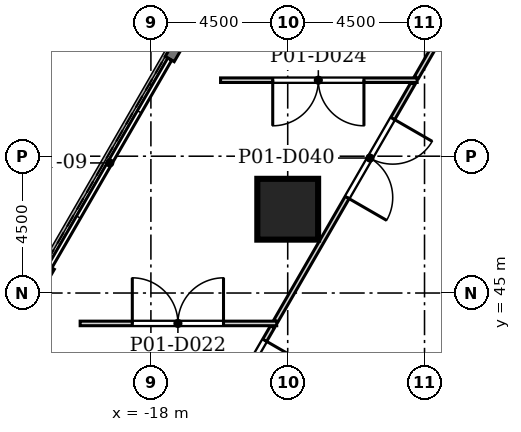
"""IFC4 building model, lengths in metres.
Left out: names, types, materials, properties, quantities, classifications, styles, units other than length and angle.
Written with IfcOpenShell. Run it as: python <this file> out.ifc"""

import sys

from ifc_helpers import new_model, si_unit, direction, frame, frame_2d, origin, origin_2d, place, context, subcontext, project, spatial, rectangle, extrude, element, fill, save


model = new_model("IFC4")
c1 = context("Model", 3, precision=1e-05, world=origin(), true_north=direction((0.0, 1.0)))
c2 = subcontext(c1, "Body", "Model", "MODEL_VIEW")
j1 = project(units=[si_unit("LENGTHUNIT", "METRE"), si_unit("PLANEANGLEUNIT", "RADIAN")], contexts=[c1])
p1 = place(None, origin())
s1 = spatial("IfcSite", under=j1, at=p1, CompositionType="ELEMENT")
p2 = place(p1, origin())
s2 = spatial("IfcBuilding", under=s1, at=p2, CompositionType="ELEMENT")
p3 = place(p2, frame((0.0, 0.0, 8.0)))
s3 = spatial("IfcBuildingStorey", under=s2, at=p3, CompositionType="ELEMENT", Elevation=8.0)
p4 = place(p3, frame((-13.5, 47.756, 0.0), z_axis=(0.0, 0.0, 1.0), x_axis=(1.0, 0.0, 0.0)))
e1 = element("IfcColumn", 1, at=p4, inside=s3, PredefinedType="COLUMN", context=c2, shape_type="SweptSolid", body=[
    extrude(rectangle(XDim=2.0, YDim=2.0, at=origin_2d()), origin(), (0.0, 0.0, 1.0), 6.0),
])
p5 = place(p3, frame((-9.324, 66.649, 0.0), z_axis=(0.0, 0.0, 1.0), x_axis=(-0.500010528026, -0.866019325341, 0.0)))
e2 = element("IfcWall", 2, at=p5, inside=s3, PredefinedType="SOLIDWALL", context=c2, shape_type="SweptSolid", body=[
    extrude(rectangle(XDim=16.115, YDim=0.34, at=frame_2d((8.058, 0.0))), origin(), (0.0, 0.0, 1.0), 5.7),
])
p6 = place(p5, frame((1.115, 0.0, 0.9)))
e3 = element("IfcOpeningElement", 3, at=p6, cuts=e2, PredefinedType="OPENING", context=c2, shape_type="SweptSolid", body=[
    extrude(rectangle(XDim=1.885, YDim=3.5, at=frame_2d((0.942, 1.75))), frame((0.0, 0.18, 0.0), z_axis=(0.0, -1.0, 0.0), x_axis=(1.0, 0.0, 0.0)), (0.0, 0.0, 1.0), 0.36),
])
p7 = place(p5, frame((4.115, 0.0, 0.9)))
e4 = element("IfcOpeningElement", 4, at=p7, cuts=e2, PredefinedType="OPENING", context=c2, shape_type="SweptSolid", body=[
    extrude(rectangle(XDim=1.885, YDim=3.5, at=frame_2d((0.942, 1.75))), frame((0.0, 0.18, 0.0), z_axis=(0.0, -1.0, 0.0), x_axis=(1.0, 0.0, 0.0)), (0.0, 0.0, 1.0), 0.36),
])
p8 = place(p5, frame((7.115, 0.0, 0.9)))
e5 = element("IfcOpeningElement", 5, at=p8, cuts=e2, PredefinedType="OPENING", context=c2, shape_type="SweptSolid", body=[
    extrude(rectangle(XDim=1.885, YDim=3.5, at=frame_2d((0.942, 1.75))), frame((0.0, 0.18, 0.0), z_axis=(0.0, -1.0, 0.0), x_axis=(1.0, 0.0, 0.0)), (0.0, 0.0, 1.0), 0.36),
])
p9 = place(p5, frame((10.115, 0.0, 0.9)))
e6 = element("IfcOpeningElement", 6, at=p9, cuts=e2, PredefinedType="OPENING", context=c2, shape_type="SweptSolid", body=[
    extrude(rectangle(XDim=1.885, YDim=3.5, at=frame_2d((0.942, 1.75))), frame((0.0, 0.18, 0.0), z_axis=(0.0, -1.0, 0.0), x_axis=(1.0, 0.0, 0.0)), (0.0, 0.0, 1.0), 0.36),
])
p10 = place(p5, frame((13.115, 0.0, 0.9)))
e7 = element("IfcOpeningElement", 7, at=p10, cuts=e2, PredefinedType="OPENING", context=c2, shape_type="SweptSolid", body=[
    extrude(rectangle(XDim=1.885, YDim=3.5, at=frame_2d((0.942, 1.75))), frame((0.0, 0.18, 0.0), z_axis=(0.0, -1.0, 0.0), x_axis=(1.0, 0.0, 0.0)), (0.0, 0.0, 1.0), 0.36),
])
p11 = place(p3, frame((-21.324, 45.864, 0.0), z_axis=(0.0, 0.0, 1.0), x_axis=(-0.500003967864, -0.866023112925, 0.0)))
e8 = element("IfcWall", 8, at=p11, inside=s3, PredefinedType="SOLIDWALL", context=c2, shape_type="SweptSolid", body=[
    extrude(rectangle(XDim=16.115, YDim=0.34, at=frame_2d((8.058, 0.0))), origin(), (0.0, 0.0, 1.0), 5.7),
])
p12 = place(p11, frame((1.115, 0.0, 0.9)))
e9 = element("IfcOpeningElement", 9, at=p12, cuts=e8, PredefinedType="OPENING", context=c2, shape_type="SweptSolid", body=[
    extrude(rectangle(XDim=1.885, YDim=3.5, at=frame_2d((0.942, 1.75))), frame((0.0, 0.18, 0.0), z_axis=(0.0, -1.0, 0.0), x_axis=(1.0, 0.0, 0.0)), (0.0, 0.0, 1.0), 0.36),
])
p13 = place(p11, frame((4.115, 0.0, 0.9)))
e10 = element("IfcOpeningElement", 10, at=p13, cuts=e8, PredefinedType="OPENING", context=c2, shape_type="SweptSolid", body=[
    extrude(rectangle(XDim=1.885, YDim=3.5, at=frame_2d((0.942, 1.75))), frame((0.0, 0.18, 0.0), z_axis=(0.0, -1.0, 0.0), x_axis=(1.0, 0.0, 0.0)), (0.0, 0.0, 1.0), 0.36),
])
p14 = place(p11, frame((7.115, 0.0, 0.9)))
e11 = element("IfcOpeningElement", 11, at=p14, cuts=e8, PredefinedType="OPENING", context=c2, shape_type="SweptSolid", body=[
    extrude(rectangle(XDim=1.885, YDim=3.5, at=frame_2d((0.942, 1.75))), frame((0.0, 0.18, 0.0), z_axis=(0.0, -1.0, 0.0), x_axis=(1.0, 0.0, 0.0)), (0.0, 0.0, 1.0), 0.36),
])
p15 = place(p11, frame((10.115, 0.0, 0.9)))
e12 = element("IfcOpeningElement", 12, at=p15, cuts=e8, PredefinedType="OPENING", context=c2, shape_type="SweptSolid", body=[
    extrude(rectangle(XDim=1.885, YDim=3.5, at=frame_2d((0.942, 1.75))), frame((0.0, 0.18, 0.0), z_axis=(0.0, -1.0, 0.0), x_axis=(1.0, 0.0, 0.0)), (0.0, 0.0, 1.0), 0.36),
])
p16 = place(p11, frame((13.115, 0.0, 0.9)))
e13 = element("IfcOpeningElement", 13, at=p16, cuts=e8, PredefinedType="OPENING", context=c2, shape_type="SweptSolid", body=[
    extrude(rectangle(XDim=1.885, YDim=3.5, at=frame_2d((0.942, 1.75))), frame((0.0, 0.18, 0.0), z_axis=(0.0, -1.0, 0.0), x_axis=(1.0, 0.0, 0.0)), (0.0, 0.0, 1.0), 0.36),
])
p17 = place(p3, frame((-19.494, 34.374, 0.0), z_axis=(0.0, 0.0, 1.0), x_axis=(0.500006534994, 0.866021630771, 0.0)))
e14 = element("IfcWall", 14, at=p17, inside=s3, PredefinedType="PARTITIONING", context=c2, shape_type="SweptSolid", body=[
    extrude(rectangle(XDim=10.985, YDim=0.15, at=frame_2d((5.493, 0.0))), origin(), (0.0, 0.0, 1.0), 5.7),
])
p18 = place(p17, frame((7.475, 0.0, 0.0)))
e15 = element("IfcOpeningElement", 15, at=p18, cuts=e14, PredefinedType="OPENING", context=c2, shape_type="SweptSolid", body=[
    extrude(rectangle(XDim=3.0, YDim=2.4, at=frame_2d((1.5, 1.2))), frame((0.0, 0.085, 0.0), z_axis=(0.0, -1.0, 0.0), x_axis=(1.0, 0.0, 0.0)), (0.0, 0.0, 1.0), 0.17),
])
p19 = place(p3, frame((-20.327, 44.0, 0.0), z_axis=(0.0, 0.0, 1.0), x_axis=(1.0, 0.0, 0.0)))
e16 = element("IfcWall", 16, at=p19, inside=s3, PredefinedType="PARTITIONING", context=c2, shape_type="SweptSolid", body=[
    extrude(rectangle(XDim=6.466, YDim=0.15, at=frame_2d((3.233, 0.0))), origin(), (0.0, 0.0, 1.0), 5.7),
])
p20 = place(p19, frame((1.716, 0.0, 0.0)))
e17 = element("IfcOpeningElement", 17, at=p20, cuts=e16, PredefinedType="OPENING", context=c2, shape_type="SweptSolid", body=[
    extrude(rectangle(XDim=3.0, YDim=2.4, at=frame_2d((1.5, 1.2))), frame((0.0, 0.085, 0.0), z_axis=(0.0, -1.0, 0.0), x_axis=(1.0, 0.0, 0.0)), (0.0, 0.0, 1.0), 0.17),
])
p21 = place(p3, frame((-13.885, 44.088, 0.0), z_axis=(0.0, 0.0, 1.0), x_axis=(0.499987617168, 0.866032552898, 0.0)))
e18 = element("IfcWall", 18, at=p21, inside=s3, PredefinedType="PARTITIONING", context=c2, shape_type="SweptSolid", body=[
    extrude(rectangle(XDim=9.006, YDim=0.15, at=frame_2d((4.503, 0.0))), origin(), (0.0, 0.0, 1.0), 5.7),
])
p22 = place(p21, frame((4.68, 0.0, 0.0)))
e19 = element("IfcOpeningElement", 19, at=p22, cuts=e18, PredefinedType="OPENING", context=c2, shape_type="SweptSolid", body=[
    extrude(rectangle(XDim=3.0, YDim=2.4, at=frame_2d((1.5, 1.2))), frame((0.0, 0.085, 0.0), z_axis=(0.0, -1.0, 0.0), x_axis=(1.0, 0.0, 0.0)), (0.0, 0.0, 1.0), 0.17),
])
p23 = place(p3, frame((-15.709, 52.0, 0.0), z_axis=(0.0, 0.0, 1.0), x_axis=(1.0, 0.0, 0.0)))
e20 = element("IfcWall", 20, at=p23, inside=s3, PredefinedType="PARTITIONING", context=c2, shape_type="SweptSolid", body=[
    extrude(rectangle(XDim=6.466, YDim=0.15, at=frame_2d((3.233, 0.0))), origin(), (0.0, 0.0, 1.0), 5.7),
])
p24 = place(p23, frame((1.716, 0.0, 0.0)))
e21 = element("IfcOpeningElement", 21, at=p24, cuts=e20, PredefinedType="OPENING", context=c2, shape_type="SweptSolid", body=[
    extrude(rectangle(XDim=3.0, YDim=2.4, at=frame_2d((1.5, 1.2))), frame((0.0, 0.085, 0.0), z_axis=(0.0, -1.0, 0.0), x_axis=(1.0, 0.0, 0.0)), (0.0, 0.0, 1.0), 0.17),
])
p25 = place(p3, frame((-9.267, 52.088, 0.0), z_axis=(0.0, 0.0, 1.0), x_axis=(0.499906209203, 0.866079547155, 0.0)))
e22 = element("IfcWall", 22, at=p25, inside=s3, PredefinedType="PARTITIONING", context=c2, shape_type="SweptSolid", body=[
    extrude(rectangle(XDim=2.684, YDim=0.15, at=frame_2d((1.342, 0.0))), origin(), (0.0, 0.0, 1.0), 5.7),
])
p26 = place(p20, origin())
e23 = element("IfcDoor", 23, at=p26, inside=s3, OperationType="DOUBLE_DOOR_SINGLE_SWING", PredefinedType="DOOR", context=c2, shape_type="SweptSolid", body=[
    extrude(rectangle(XDim=3.0, YDim=2.4, at=frame_2d((1.5, 1.2))), frame((0.0, 0.025, 0.0), z_axis=(0.0, -1.0, 0.0), x_axis=(1.0, 0.0, 0.0)), (0.0, 0.0, 1.0), 0.05),
])
fill(e17, e23)
p27 = place(p24, frame((3.0, 0.0, 0.0), z_axis=(0.0, 0.0, 1.0), x_axis=(-1.0, 0.0, 0.0)))
e24 = element("IfcDoor", 24, at=p27, inside=s3, OperationType="DOUBLE_DOOR_SINGLE_SWING", PredefinedType="DOOR", context=c2, shape_type="SweptSolid", body=[
    extrude(rectangle(XDim=3.0, YDim=2.4, at=frame_2d((1.5, 1.2))), frame((0.0, 0.025, 0.0), z_axis=(0.0, -1.0, 0.0), x_axis=(1.0, 0.0, 0.0)), (0.0, 0.0, 1.0), 0.05),
])
fill(e21, e24)
p28 = place(p18, frame((3.0, 0.0, 0.0), z_axis=(0.0, 0.0, 1.0), x_axis=(-1.0, 0.0, 0.0)))
e25 = element("IfcDoor", 25, at=p28, inside=s3, OperationType="DOUBLE_DOOR_SINGLE_SWING", PredefinedType="DOOR", context=c2, shape_type="SweptSolid", body=[
    extrude(rectangle(XDim=3.0, YDim=2.4, at=frame_2d((1.5, 1.2))), frame((0.0, 0.025, 0.0), z_axis=(0.0, -1.0, 0.0), x_axis=(1.0, 0.0, 0.0)), (0.0, 0.0, 1.0), 0.05),
])
fill(e15, e25)
p29 = place(p22, frame((3.0, 0.0, 0.0), z_axis=(0.0, 0.0, 1.0), x_axis=(-1.0, 0.0, 0.0)))
e26 = element("IfcDoor", 26, at=p29, inside=s3, OperationType="DOUBLE_DOOR_SINGLE_SWING", PredefinedType="DOOR", context=c2, shape_type="SweptSolid", body=[
    extrude(rectangle(XDim=3.0, YDim=2.4, at=frame_2d((1.5, 1.2))), frame((0.0, 0.025, 0.0), z_axis=(0.0, -1.0, 0.0), x_axis=(1.0, 0.0, 0.0)), (0.0, 0.0, 1.0), 0.05),
])
fill(e19, e26)
save(model, sys.argv[1])
